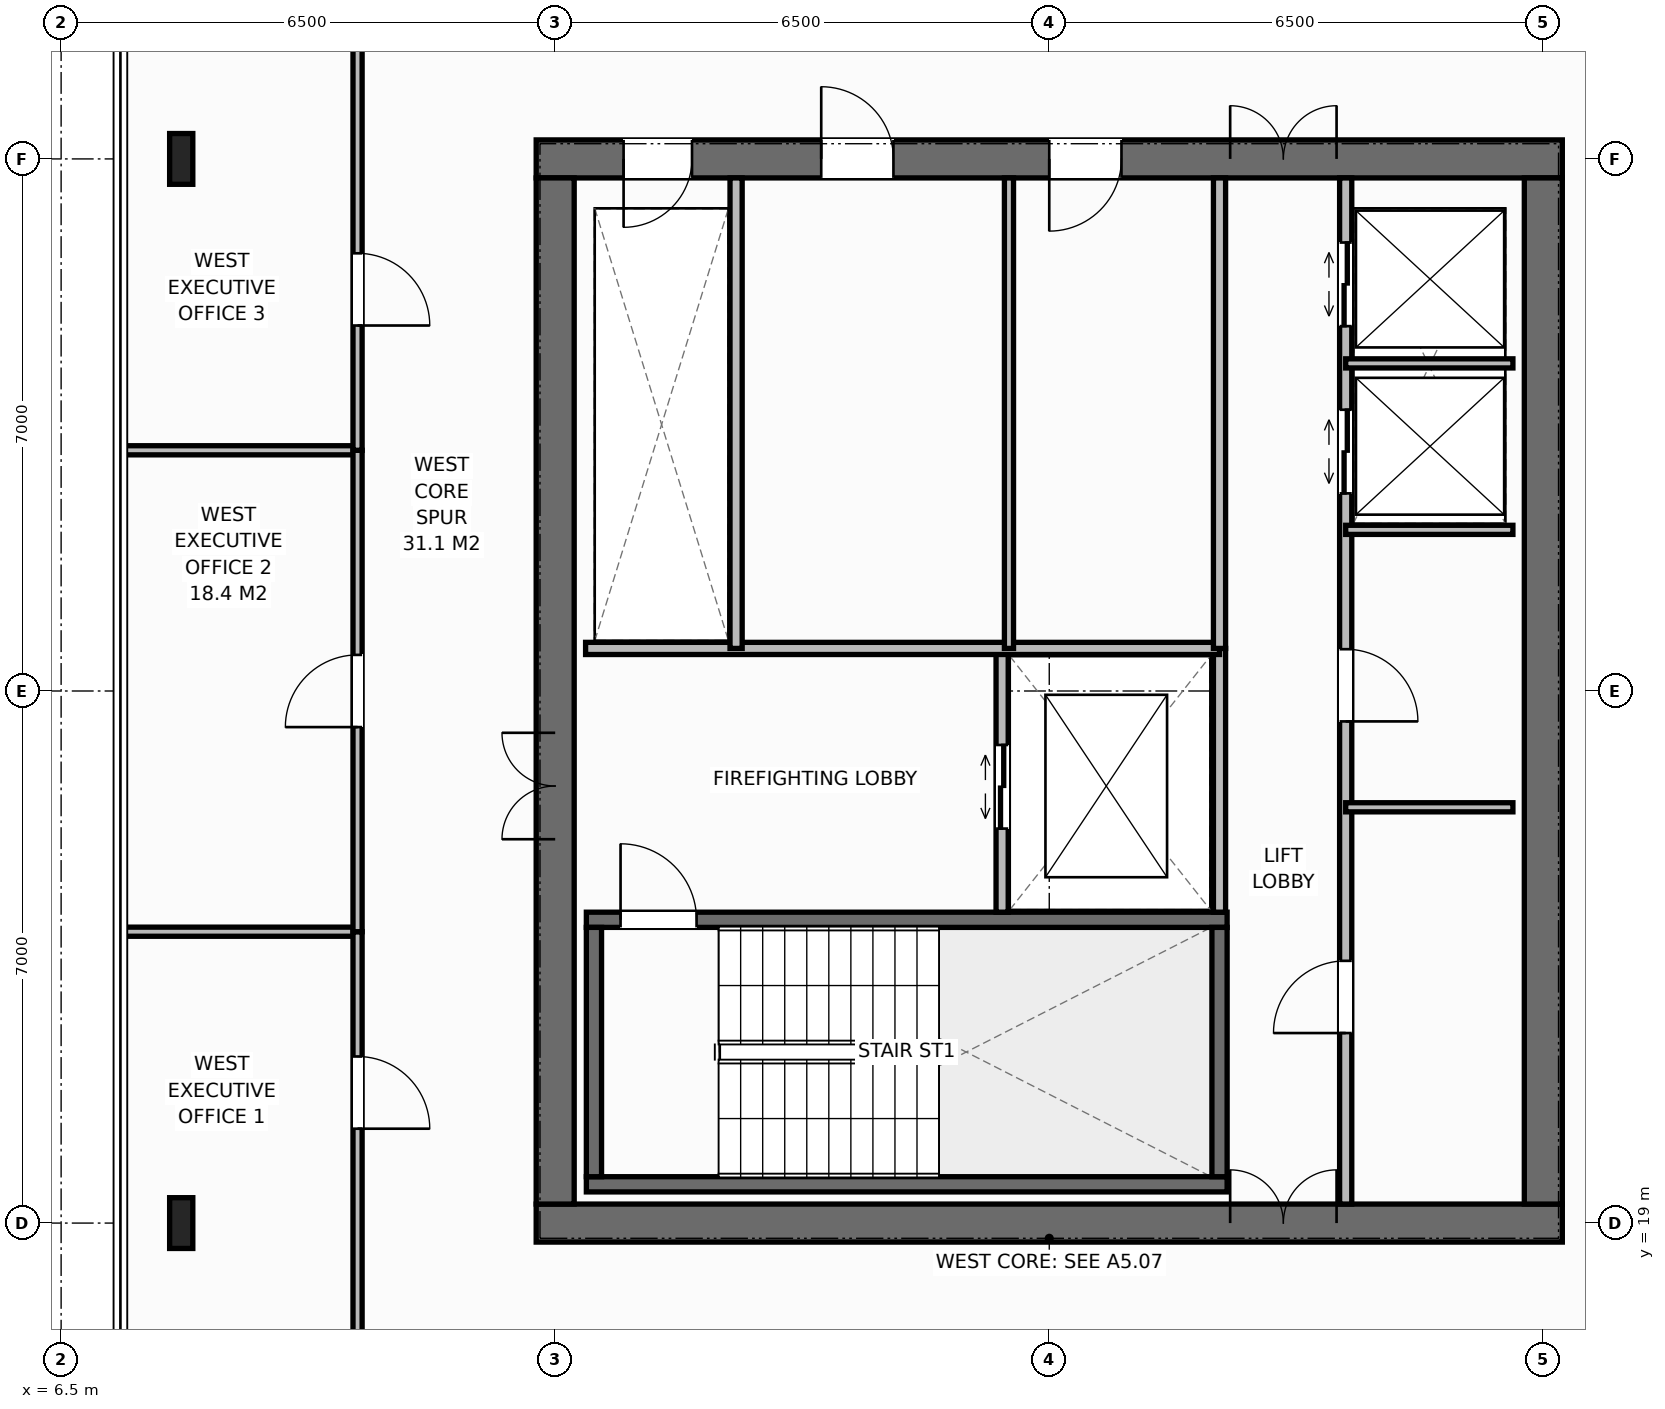
"""IFC4 building model, lengths in metres.
Left out: names, types, materials, properties, quantities, classifications, styles, units other than length and angle.
Written with IfcOpenShell. Run it as: python <this file> out.ifc"""

import sys

from ifc_helpers import new_model, si_unit, direction, frame, frame_2d, origin, origin_2d, place, context, subcontext, project, spatial, rectangle, i_section, extrude, element, fill, save


model = new_model("IFC4")
c1 = context("Model", 3, precision=1e-05, world=origin(), true_north=direction((0.0, 1.0)))
c2 = subcontext(c1, "Body", "Model", "MODEL_VIEW")
j1 = project(units=[si_unit("LENGTHUNIT", "METRE"), si_unit("PLANEANGLEUNIT", "RADIAN")], contexts=[c1])
p1 = place(None, origin())
s1 = spatial("IfcSite", under=j1, at=p1, CompositionType="ELEMENT")
p2 = place(p1, origin())
s2 = spatial("IfcBuilding", under=s1, at=p2, CompositionType="ELEMENT")
p3 = place(p2, frame((0.0, 0.0, 259.4)))
s3 = spatial("IfcBuildingStorey", under=s2, at=p3, CompositionType="ELEMENT", Elevation=259.4)
p4 = place(p3, frame((12.75, 19.0, 0.0), z_axis=(0.0, 0.0, 1.0), x_axis=(1.0, 0.0, 0.0)))
e1 = element("IfcWall", 1, at=p4, inside=s3, PredefinedType="SHEAR", context=c2, shape_type="SweptSolid", body=[
    extrude(rectangle(XDim=13.5, YDim=0.5, at=frame_2d((6.75, 0.0))), origin(), (0.0, 0.0, 1.0), 3.8),
])
p5 = place(p4, frame((9.13, 0.0, 0.0)))
e2 = element("IfcOpeningElement", 2, at=p5, cuts=e1, PredefinedType="OPENING", context=c2, shape_type="SweptSolid", body=[
    extrude(rectangle(XDim=1.4, YDim=2.2, at=frame_2d((0.7, 1.1))), frame((0.0, 0.26, 0.0), z_axis=(0.0, -1.0, 0.0), x_axis=(1.0, 0.0, 0.0)), (0.0, 0.0, 1.0), 0.52),
])
p6 = place(p3, frame((12.75, 33.0, 0.0), z_axis=(0.0, 0.0, 1.0), x_axis=(1.0, 0.0, 0.0)))
e3 = element("IfcWall", 3, at=p6, inside=s3, PredefinedType="SHEAR", context=c2, shape_type="SweptSolid", body=[
    extrude(rectangle(XDim=13.5, YDim=0.5, at=frame_2d((6.75, 0.0))), origin(), (0.0, 0.0, 1.0), 3.8),
])
p7 = place(p6, frame((1.15, 0.0, 0.0)))
e4 = element("IfcOpeningElement", 4, at=p7, cuts=e3, PredefinedType="OPENING", context=c2, shape_type="SweptSolid", body=[
    extrude(rectangle(XDim=0.9, YDim=2.15, at=frame_2d((0.45, 1.075))), frame((0.0, 0.26, 0.0), z_axis=(0.0, -1.0, 0.0), x_axis=(1.0, 0.0, 0.0)), (0.0, 0.0, 1.0), 0.52),
])
p8 = place(p6, frame((3.75, 0.0, 0.0)))
e5 = element("IfcOpeningElement", 5, at=p8, cuts=e3, PredefinedType="OPENING", context=c2, shape_type="SweptSolid", body=[
    extrude(rectangle(XDim=0.95, YDim=2.15, at=frame_2d((0.475, 1.075))), frame((0.0, 0.26, 0.0), z_axis=(0.0, -1.0, 0.0), x_axis=(1.0, 0.0, 0.0)), (0.0, 0.0, 1.0), 0.52),
])
p9 = place(p6, frame((6.75, 0.0, 0.0)))
e6 = element("IfcOpeningElement", 6, at=p9, cuts=e3, PredefinedType="OPENING", context=c2, shape_type="SweptSolid", body=[
    extrude(rectangle(XDim=0.95, YDim=2.15, at=frame_2d((0.475, 1.075))), frame((0.0, 0.26, 0.0), z_axis=(0.0, -1.0, 0.0), x_axis=(1.0, 0.0, 0.0)), (0.0, 0.0, 1.0), 0.52),
])
p10 = place(p6, frame((9.13, 0.0, 0.0)))
e7 = element("IfcOpeningElement", 7, at=p10, cuts=e3, PredefinedType="OPENING", context=c2, shape_type="SweptSolid", body=[
    extrude(rectangle(XDim=1.4, YDim=2.2, at=frame_2d((0.7, 1.1))), frame((0.0, 0.26, 0.0), z_axis=(0.0, -1.0, 0.0), x_axis=(1.0, 0.0, 0.0)), (0.0, 0.0, 1.0), 0.52),
])
p11 = place(p3, frame((13.0, 19.25, 0.0), z_axis=(0.0, 0.0, 1.0), x_axis=(0.0, 1.0, 0.0)))
e8 = element("IfcWall", 8, at=p11, inside=s3, PredefinedType="SHEAR", context=c2, shape_type="SweptSolid", body=[
    extrude(rectangle(XDim=13.5, YDim=0.5, at=frame_2d((6.75, 0.0))), origin(), (0.0, 0.0, 1.0), 3.8),
])
p12 = place(p11, frame((4.8, 0.0, 0.0)))
e9 = element("IfcOpeningElement", 9, at=p12, cuts=e8, PredefinedType="OPENING", context=c2, shape_type="SweptSolid", body=[
    extrude(rectangle(XDim=1.4, YDim=2.2, at=frame_2d((0.7, 1.1))), frame((0.0, 0.26, 0.0), z_axis=(0.0, -1.0, 0.0), x_axis=(1.0, 0.0, 0.0)), (0.0, 0.0, 1.0), 0.52),
])
p13 = place(p3, frame((26.0, 19.25, 0.0), z_axis=(0.0, 0.0, 1.0), x_axis=(0.0, 1.0, 0.0)))
e10 = element("IfcWall", 10, at=p13, inside=s3, PredefinedType="SHEAR", context=c2, shape_type="SweptSolid", body=[
    extrude(rectangle(XDim=13.5, YDim=0.5, at=frame_2d((6.75, 0.0))), origin(), (0.0, 0.0, 1.0), 3.8),
])
p14 = place(p3, frame((13.41, 19.51, 0.0), z_axis=(0.0, 0.0, 1.0), x_axis=(1.0, 0.0, 0.0)))
e11 = element("IfcWall", 11, at=p14, inside=s3, PredefinedType="SHEAR", context=c2, shape_type="SweptSolid", body=[
    extrude(rectangle(XDim=8.43, YDim=0.2, at=frame_2d((4.215, 0.0))), origin(), (0.0, 0.0, 1.0), 3.8),
])
p15 = place(p3, frame((13.41, 22.99, 0.0), z_axis=(0.0, 0.0, 1.0), x_axis=(1.0, 0.0, 0.0)))
e12 = element("IfcWall", 12, at=p15, inside=s3, PredefinedType="SHEAR", context=c2, shape_type="SweptSolid", body=[
    extrude(rectangle(XDim=8.43, YDim=0.2, at=frame_2d((4.215, 0.0))), origin(), (0.0, 0.0, 1.0), 3.8),
])
p16 = place(p15, frame((0.45, 0.0, 0.0)))
e13 = element("IfcOpeningElement", 13, at=p16, cuts=e12, PredefinedType="OPENING", context=c2, shape_type="SweptSolid", body=[
    extrude(rectangle(XDim=1.0, YDim=2.15, at=frame_2d((0.5, 1.075))), frame((0.0, 0.11, 0.0), z_axis=(0.0, -1.0, 0.0), x_axis=(1.0, 0.0, 0.0)), (0.0, 0.0, 1.0), 0.22),
])
for number, where, z_axis, x_axis in (
    (14, (13.51, 19.61, 0.0), (0.0, 0.0, 1.0), (0.0, 1.0, 0.0)),
    (15, (21.74, 19.61, 0.0), (0.0, 0.0, 1.0), (0.0, 1.0, 0.0)),
):
    element("IfcWall", number, at=place(p3, frame(where, z_axis=z_axis, x_axis=x_axis)), inside=s3, PredefinedType="SHEAR", context=c2, shape_type="SweptSolid", body=[
        extrude(rectangle(XDim=3.28, YDim=0.2, at=frame_2d((1.64, 0.0))), origin(), (0.0, 0.0, 1.0), 3.8),
    ])
for number, where, z_axis, x_axis in (
    (16, (8.08, 19.0, 0.0), (0.0, 0.0, 1.0), (1.0, 0.0, 0.0)),
    (17, (8.08, 33.0, 0.0), (0.0, 0.0, 1.0), (1.0, 0.0, 0.0)),
):
    element("IfcColumn", number, at=place(p3, frame(where, z_axis=z_axis, x_axis=x_axis)), inside=s3, PredefinedType="COLUMN", context=c2, shape_type="SweptSolid", body=[
        extrude(i_section(OverallWidth=0.305, OverallDepth=0.668, WebThickness=0.021, FlangeThickness=0.04, at=origin_2d()), origin(), (0.0, 0.0, 1.0), 3.8),
    ])
p17 = place(p3, frame((21.74, 23.09, 0.0), z_axis=(0.0, 0.0, 1.0), x_axis=(0.0, 1.0, 0.0)))
e18 = element("IfcWall", 18, at=p17, inside=s3, PredefinedType="STANDARD", context=c2, shape_type="SweptSolid", body=[
    extrude(rectangle(XDim=3.47, YDim=0.16, at=frame_2d((1.735, 0.0))), origin(), (0.0, 0.0, 1.0), 3.588),
])
p18 = place(p3, frame((18.88, 23.09, 0.0), z_axis=(0.0, 0.0, 1.0), x_axis=(0.0, 1.0, 0.0)))
e19 = element("IfcWall", 19, at=p18, inside=s3, PredefinedType="STANDARD", context=c2, shape_type="SweptSolid", body=[
    extrude(rectangle(XDim=3.47, YDim=0.16, at=frame_2d((1.735, 0.0))), origin(), (0.0, 0.0, 1.0), 3.588),
])
p19 = place(p18, frame((1.1, 0.0, 0.0)))
e20 = element("IfcOpeningElement", 20, at=p19, cuts=e19, PredefinedType="OPENING", context=c2, shape_type="SweptSolid", body=[
    extrude(rectangle(XDim=1.1, YDim=2.2, at=frame_2d((0.55, 1.1))), frame((0.0, 0.09, 0.0), z_axis=(0.0, -1.0, 0.0), x_axis=(1.0, 0.0, 0.0)), (0.0, 0.0, 1.0), 0.18),
])
p20 = place(p3, frame((13.4, 26.56, 0.0), z_axis=(0.0, 0.0, 1.0), x_axis=(1.0, 0.0, 0.0)))
e21 = element("IfcWall", 21, at=p20, inside=s3, PredefinedType="STANDARD", context=c2, shape_type="SweptSolid", body=[
    extrude(rectangle(XDim=8.34, YDim=0.16, at=frame_2d((4.17, 0.0))), origin(), (0.0, 0.0, 1.0), 3.588),
])
p21 = place(p3, frame((15.38, 26.56, 0.0), z_axis=(0.0, 0.0, 1.0), x_axis=(0.0, 1.0, 0.0)))
e22 = element("IfcWall", 22, at=p21, inside=s3, PredefinedType="STANDARD", context=c2, shape_type="SweptSolid", body=[
    extrude(rectangle(XDim=6.19, YDim=0.16, at=frame_2d((3.095, 0.0))), origin(), (0.0, 0.0, 1.0), 3.588),
])
p22 = place(p3, frame((18.97, 26.56, 0.0), z_axis=(0.0, 0.0, 1.0), x_axis=(0.0, 1.0, 0.0)))
e23 = element("IfcWall", 23, at=p22, inside=s3, PredefinedType="PARTITIONING", context=c2, shape_type="SweptSolid", body=[
    extrude(rectangle(XDim=6.19, YDim=0.12, at=frame_2d((3.095, 0.0))), origin(), (0.0, 0.0, 1.0), 3.588),
])
p23 = place(p3, frame((21.74, 26.56, 0.0), z_axis=(0.0, 0.0, 1.0), x_axis=(0.0, 1.0, 0.0)))
e24 = element("IfcWall", 24, at=p23, inside=s3, PredefinedType="STANDARD", context=c2, shape_type="SweptSolid", body=[
    extrude(rectangle(XDim=6.19, YDim=0.16, at=frame_2d((3.095, 0.0))), origin(), (0.0, 0.0, 1.0), 3.588),
])
p24 = place(p3, frame((23.4, 19.25, 0.0), z_axis=(0.0, 0.0, 1.0), x_axis=(0.0, 1.0, 0.0)))
e25 = element("IfcWall", 25, at=p24, inside=s3, PredefinedType="STANDARD", context=c2, shape_type="SweptSolid", body=[
    extrude(rectangle(XDim=13.5, YDim=0.16, at=frame_2d((6.75, 0.0))), origin(), (0.0, 0.0, 1.0), 3.588),
])
p25 = place(p24, frame((2.25, 0.0, 0.0)))
e26 = element("IfcOpeningElement", 26, at=p25, cuts=e25, PredefinedType="OPENING", context=c2, shape_type="SweptSolid", body=[
    extrude(rectangle(XDim=0.95, YDim=2.15, at=frame_2d((0.475, 1.075))), frame((0.0, 0.09, 0.0), z_axis=(0.0, -1.0, 0.0), x_axis=(1.0, 0.0, 0.0)), (0.0, 0.0, 1.0), 0.18),
])
p26 = place(p24, frame((6.35, 0.0, 0.0)))
e27 = element("IfcOpeningElement", 27, at=p26, cuts=e25, PredefinedType="OPENING", context=c2, shape_type="SweptSolid", body=[
    extrude(rectangle(XDim=0.95, YDim=2.15, at=frame_2d((0.475, 1.075))), frame((0.0, 0.09, 0.0), z_axis=(0.0, -1.0, 0.0), x_axis=(1.0, 0.0, 0.0)), (0.0, 0.0, 1.0), 0.18),
])
p27 = place(p24, frame((9.35, 0.0, 0.0)))
e28 = element("IfcOpeningElement", 28, at=p27, cuts=e25, PredefinedType="OPENING", context=c2, shape_type="SweptSolid", body=[
    extrude(rectangle(XDim=1.1, YDim=2.2, at=frame_2d((0.55, 1.1))), frame((0.0, 0.09, 0.0), z_axis=(0.0, -1.0, 0.0), x_axis=(1.0, 0.0, 0.0)), (0.0, 0.0, 1.0), 0.18),
])
p28 = place(p24, frame((11.55, 0.0, 0.0)))
e29 = element("IfcOpeningElement", 29, at=p28, cuts=e25, PredefinedType="OPENING", context=c2, shape_type="SweptSolid", body=[
    extrude(rectangle(XDim=1.1, YDim=2.2, at=frame_2d((0.55, 1.1))), frame((0.0, 0.09, 0.0), z_axis=(0.0, -1.0, 0.0), x_axis=(1.0, 0.0, 0.0)), (0.0, 0.0, 1.0), 0.18),
])
for number, where, z_axis, x_axis in (
    (30, (23.4, 24.47, 0.0), (0.0, 0.0, 1.0), (1.0, 0.0, 0.0)),
    (31, (23.4, 28.12, 0.0), (0.0, 0.0, 1.0), (1.0, 0.0, 0.0)),
    (32, (23.4, 30.31, 0.0), (0.0, 0.0, 1.0), (1.0, 0.0, 0.0)),
):
    element("IfcWall", number, at=place(p3, frame(where, z_axis=z_axis, x_axis=x_axis)), inside=s3, PredefinedType="PARTITIONING", context=c2, shape_type="SweptSolid", body=[
        extrude(rectangle(XDim=2.2, YDim=0.12, at=frame_2d((1.1, 0.0))), origin(), (0.0, 0.0, 1.0), 3.588),
    ])
p29 = place(p3, frame((7.22, 22.833, 0.0), z_axis=(0.0, 0.0, 1.0), x_axis=(1.0, 0.0, 0.0)))
e33 = element("IfcWall", 33, at=p29, inside=s3, PredefinedType="PARTITIONING", context=c2, shape_type="SweptSolid", body=[
    extrude(rectangle(XDim=3.18, YDim=0.12, at=frame_2d((1.59, 0.0))), origin(), (0.0, 0.0, 1.0), 3.588),
])
p30 = place(p3, frame((10.4, 16.5, 0.0), z_axis=(0.0, 0.0, 1.0), x_axis=(0.0, 1.0, 0.0)))
e34 = element("IfcWall", 34, at=p30, inside=s3, PredefinedType="PARTITIONING", context=c2, shape_type="SweptSolid", body=[
    extrude(rectangle(XDim=6.333, YDim=0.12, at=frame_2d((3.167, 0.0))), origin(), (0.0, 0.0, 1.0), 3.588),
])
p31 = place(p30, frame((3.742, 0.0, 0.0)))
e35 = element("IfcOpeningElement", 35, at=p31, cuts=e34, PredefinedType="OPENING", context=c2, shape_type="SweptSolid", body=[
    extrude(rectangle(XDim=0.95, YDim=2.15, at=frame_2d((0.475, 1.075))), frame((0.0, 0.07, 0.0), z_axis=(0.0, -1.0, 0.0), x_axis=(1.0, 0.0, 0.0)), (0.0, 0.0, 1.0), 0.14),
])
p32 = place(p3, frame((7.22, 29.167, 0.0), z_axis=(0.0, 0.0, 1.0), x_axis=(1.0, 0.0, 0.0)))
e36 = element("IfcWall", 36, at=p32, inside=s3, PredefinedType="PARTITIONING", context=c2, shape_type="SweptSolid", body=[
    extrude(rectangle(XDim=3.18, YDim=0.12, at=frame_2d((1.59, 0.0))), origin(), (0.0, 0.0, 1.0), 3.588),
])
p33 = place(p3, frame((10.4, 22.833, 0.0), z_axis=(0.0, 0.0, 1.0), x_axis=(0.0, 1.0, 0.0)))
e37 = element("IfcWall", 37, at=p33, inside=s3, PredefinedType="PARTITIONING", context=c2, shape_type="SweptSolid", body=[
    extrude(rectangle(XDim=6.333, YDim=0.12, at=frame_2d((3.167, 0.0))), origin(), (0.0, 0.0, 1.0), 3.588),
])
p34 = place(p33, frame((2.692, 0.0, 0.0)))
e38 = element("IfcOpeningElement", 38, at=p34, cuts=e37, PredefinedType="OPENING", context=c2, shape_type="SweptSolid", body=[
    extrude(rectangle(XDim=0.95, YDim=2.15, at=frame_2d((0.475, 1.075))), frame((0.0, 0.07, 0.0), z_axis=(0.0, -1.0, 0.0), x_axis=(1.0, 0.0, 0.0)), (0.0, 0.0, 1.0), 0.14),
])
p35 = place(p3, frame((10.4, 29.167, 0.0), z_axis=(0.0, 0.0, 1.0), x_axis=(0.0, 1.0, 0.0)))
e39 = element("IfcWall", 39, at=p35, inside=s3, PredefinedType="PARTITIONING", context=c2, shape_type="SweptSolid", body=[
    extrude(rectangle(XDim=6.333, YDim=0.12, at=frame_2d((3.167, 0.0))), origin(), (0.0, 0.0, 1.0), 3.588),
])
p36 = place(p35, frame((1.642, 0.0, 0.0)))
e40 = element("IfcOpeningElement", 40, at=p36, cuts=e39, PredefinedType="OPENING", context=c2, shape_type="SweptSolid", body=[
    extrude(rectangle(XDim=0.95, YDim=2.15, at=frame_2d((0.475, 1.075))), frame((0.0, 0.07, 0.0), z_axis=(0.0, -1.0, 0.0), x_axis=(1.0, 0.0, 0.0)), (0.0, 0.0, 1.0), 0.14),
])
p37 = place(p16, origin())
e41 = element("IfcDoor", 41, at=p37, inside=s3, OperationType="SINGLE_SWING_LEFT", PredefinedType="DOOR", context=c2, shape_type="SweptSolid", body=[
    extrude(rectangle(XDim=1.0, YDim=2.15, at=frame_2d((0.5, 1.075))), frame((0.0, 0.025, 0.0), z_axis=(0.0, -1.0, 0.0), x_axis=(1.0, 0.0, 0.0)), (0.0, 0.0, 1.0), 0.05),
])
fill(e13, e41)
p38 = place(p12, origin())
e42 = element("IfcDoor", 42, at=p38, inside=s3, OperationType="DOUBLE_DOOR_SINGLE_SWING", PredefinedType="DOOR", context=c2, shape_type="SweptSolid", body=[
    extrude(rectangle(XDim=1.4, YDim=2.2, at=frame_2d((0.7, 1.1))), frame((0.0, 0.025, 0.0), z_axis=(0.0, -1.0, 0.0), x_axis=(1.0, 0.0, 0.0)), (0.0, 0.0, 1.0), 0.05),
])
fill(e9, e42)
p39 = place(p19, origin())
e43 = element("IfcDoor", 43, at=p39, inside=s3, OperationType="DOUBLE_DOOR_SLIDING", PredefinedType="DOOR", context=c2, shape_type="SweptSolid", body=[
    extrude(rectangle(XDim=1.1, YDim=2.2, at=frame_2d((0.55, 1.1))), frame((0.0, 0.025, 0.0), z_axis=(0.0, -1.0, 0.0), x_axis=(1.0, 0.0, 0.0)), (0.0, 0.0, 1.0), 0.05),
])
fill(e20, e43)
p40 = place(p7, origin())
e44 = element("IfcDoor", 44, at=p40, inside=s3, OperationType="SINGLE_SWING_RIGHT", PredefinedType="DOOR", context=c2, shape_type="SweptSolid", body=[
    extrude(rectangle(XDim=0.9, YDim=2.15, at=frame_2d((0.45, 1.075))), frame((0.0, -0.025, 0.0), z_axis=(0.0, -1.0, 0.0), x_axis=(1.0, 0.0, 0.0)), (0.0, 0.0, 1.0), 0.05),
])
fill(e4, e44)
p41 = place(p8, origin())
e45 = element("IfcDoor", 45, at=p41, inside=s3, OperationType="SINGLE_SWING_LEFT", PredefinedType="DOOR", context=c2, shape_type="SweptSolid", body=[
    extrude(rectangle(XDim=0.95, YDim=2.15, at=frame_2d((0.475, 1.075))), frame((0.0, -0.025, 0.0), z_axis=(0.0, -1.0, 0.0), x_axis=(1.0, 0.0, 0.0)), (0.0, 0.0, 1.0), 0.05),
])
fill(e5, e45)
p42 = place(p9, origin())
e46 = element("IfcDoor", 46, at=p42, inside=s3, OperationType="SINGLE_SWING_RIGHT", PredefinedType="DOOR", context=c2, shape_type="SweptSolid", body=[
    extrude(rectangle(XDim=0.95, YDim=2.15, at=frame_2d((0.475, 1.075))), frame((0.0, -0.025, 0.0), z_axis=(0.0, -1.0, 0.0), x_axis=(1.0, 0.0, 0.0)), (0.0, 0.0, 1.0), 0.05),
])
fill(e6, e46)
p43 = place(p5, origin())
e47 = element("IfcDoor", 47, at=p43, inside=s3, OperationType="DOUBLE_DOOR_SINGLE_SWING", PredefinedType="DOOR", context=c2, shape_type="SweptSolid", body=[
    extrude(rectangle(XDim=1.4, YDim=2.2, at=frame_2d((0.7, 1.1))), frame((0.0, 0.075, 0.0), z_axis=(0.0, -1.0, 0.0), x_axis=(1.0, 0.0, 0.0)), (0.0, 0.0, 1.0), 0.05),
])
fill(e2, e47)
p44 = place(p10, origin())
e48 = element("IfcDoor", 48, at=p44, inside=s3, OperationType="DOUBLE_DOOR_SINGLE_SWING", PredefinedType="DOOR", context=c2, shape_type="SweptSolid", body=[
    extrude(rectangle(XDim=1.4, YDim=2.2, at=frame_2d((0.7, 1.1))), frame((0.0, -0.025, 0.0), z_axis=(0.0, -1.0, 0.0), x_axis=(1.0, 0.0, 0.0)), (0.0, 0.0, 1.0), 0.05),
])
fill(e7, e48)
p45 = place(p25, origin())
e49 = element("IfcDoor", 49, at=p45, inside=s3, OperationType="SINGLE_SWING_LEFT", PredefinedType="DOOR", context=c2, shape_type="SweptSolid", body=[
    extrude(rectangle(XDim=0.95, YDim=2.15, at=frame_2d((0.475, 1.075))), frame((0.0, 0.025, 0.0), z_axis=(0.0, -1.0, 0.0), x_axis=(1.0, 0.0, 0.0)), (0.0, 0.0, 1.0), 0.05),
])
fill(e26, e49)
p46 = place(p26, origin())
e50 = element("IfcDoor", 50, at=p46, inside=s3, OperationType="SINGLE_SWING_RIGHT", PredefinedType="DOOR", context=c2, shape_type="SweptSolid", body=[
    extrude(rectangle(XDim=0.95, YDim=2.15, at=frame_2d((0.475, 1.075))), frame((0.0, 0.025, 0.0), z_axis=(0.0, -1.0, 0.0), x_axis=(1.0, 0.0, 0.0)), (0.0, 0.0, 1.0), 0.05),
])
fill(e27, e50)
p47 = place(p27, origin())
e51 = element("IfcDoor", 51, at=p47, inside=s3, OperationType="DOUBLE_DOOR_SLIDING", PredefinedType="DOOR", context=c2, shape_type="SweptSolid", body=[
    extrude(rectangle(XDim=1.1, YDim=2.2, at=frame_2d((0.55, 1.1))), frame((0.0, 0.025, 0.0), z_axis=(0.0, -1.0, 0.0), x_axis=(1.0, 0.0, 0.0)), (0.0, 0.0, 1.0), 0.05),
])
fill(e28, e51)
p48 = place(p28, origin())
e52 = element("IfcDoor", 52, at=p48, inside=s3, OperationType="DOUBLE_DOOR_SLIDING", PredefinedType="DOOR", context=c2, shape_type="SweptSolid", body=[
    extrude(rectangle(XDim=1.1, YDim=2.2, at=frame_2d((0.55, 1.1))), frame((0.0, 0.025, 0.0), z_axis=(0.0, -1.0, 0.0), x_axis=(1.0, 0.0, 0.0)), (0.0, 0.0, 1.0), 0.05),
])
fill(e29, e52)
p49 = place(p31, origin())
e53 = element("IfcDoor", 53, at=p49, inside=s3, OperationType="SINGLE_SWING_RIGHT", PredefinedType="DOOR", context=c2, shape_type="SweptSolid", body=[
    extrude(rectangle(XDim=0.95, YDim=2.15, at=frame_2d((0.475, 1.075))), frame((0.0, 0.025, 0.0), z_axis=(0.0, -1.0, 0.0), x_axis=(1.0, 0.0, 0.0)), (0.0, 0.0, 1.0), 0.05),
])
fill(e35, e53)
p50 = place(p34, origin())
e54 = element("IfcDoor", 54, at=p50, inside=s3, OperationType="SINGLE_SWING_LEFT", PredefinedType="DOOR", context=c2, shape_type="SweptSolid", body=[
    extrude(rectangle(XDim=0.95, YDim=2.15, at=frame_2d((0.475, 1.075))), frame((0.0, 0.025, 0.0), z_axis=(0.0, -1.0, 0.0), x_axis=(1.0, 0.0, 0.0)), (0.0, 0.0, 1.0), 0.05),
])
fill(e38, e54)
p51 = place(p36, origin())
e55 = element("IfcDoor", 55, at=p51, inside=s3, OperationType="SINGLE_SWING_RIGHT", PredefinedType="DOOR", context=c2, shape_type="SweptSolid", body=[
    extrude(rectangle(XDim=0.95, YDim=2.15, at=frame_2d((0.475, 1.075))), frame((0.0, 0.025, 0.0), z_axis=(0.0, -1.0, 0.0), x_axis=(1.0, 0.0, 0.0)), (0.0, 0.0, 1.0), 0.05),
])
fill(e40, e55)
save(model, sys.argv[1])
